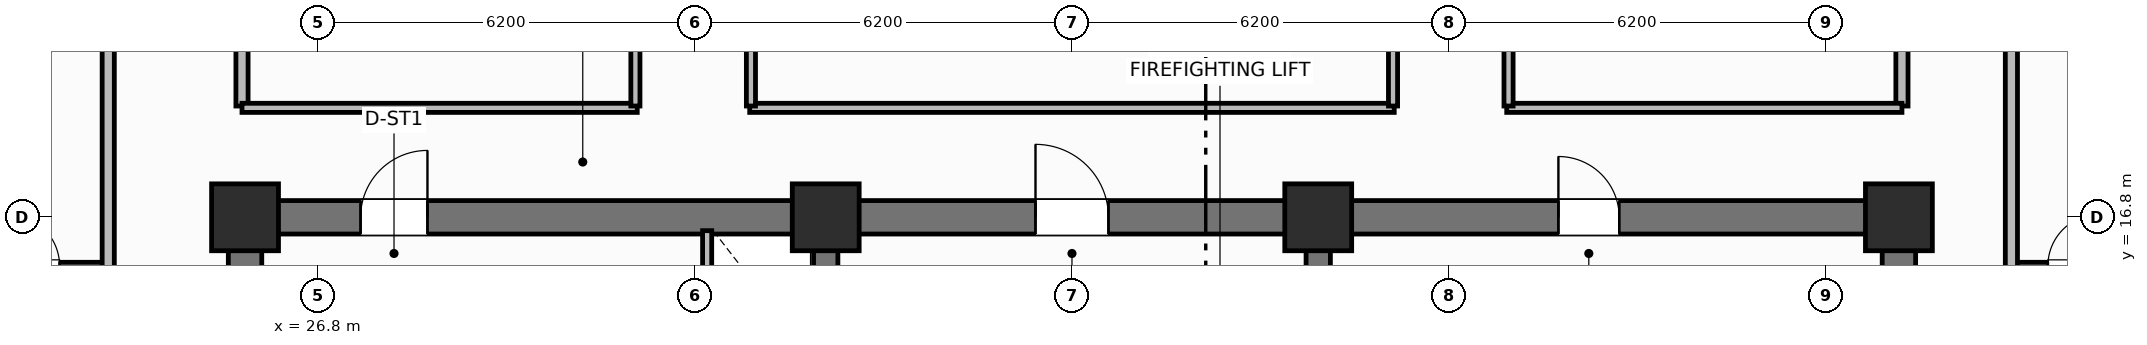
"""IFC4 building model, lengths in metres.
Left out: names, types, materials, properties, quantities, classifications, styles, units other than length and angle.
Written with IfcOpenShell. Run it as: python <this file> out.ifc"""

import sys

from ifc_helpers import new_model, si_unit, direction, frame, frame_2d, origin, origin_2d, place, context, subcontext, project, spatial, rectangle, extrude, element, fill, save


model = new_model("IFC4")
c1 = context("Model", 3, precision=1e-05, world=origin(), true_north=direction((0.0, 1.0)))
c2 = subcontext(c1, "Body", "Model", "MODEL_VIEW")
j1 = project(units=[si_unit("LENGTHUNIT", "METRE"), si_unit("PLANEANGLEUNIT", "RADIAN")], contexts=[c1])
p1 = place(None, origin())
s1 = spatial("IfcSite", under=j1, at=p1, CompositionType="ELEMENT")
p2 = place(p1, origin())
s2 = spatial("IfcBuilding", under=s1, at=p2, CompositionType="ELEMENT")
p3 = place(p2, frame((0.0, 0.0, 121.6)))
s3 = spatial("IfcBuildingStorey", under=s2, at=p3, CompositionType="ELEMENT", Elevation=121.6)
for number, where, z_axis, x_axis in (
    (1, (25.6, 10.875, 0.0), (0.0, 0.0, 1.0), (0.0, 1.0, 0.0)),
    (2, (52.8, 10.875, 0.0), (0.0, 0.0, 1.0), (0.0, 1.0, 0.0)),
):
    element("IfcWall", number, at=place(p3, frame(where, z_axis=z_axis, x_axis=x_axis)), inside=s3, PredefinedType="SHEAR", context=c2, shape_type="SweptSolid", body=[
        extrude(rectangle(XDim=5.65, YDim=0.55, at=frame_2d((2.825, 0.0))), origin(), (0.0, 0.0, 1.0), 3.7),
    ])
p4 = place(p3, frame((25.6, 16.8, 0.0), z_axis=(0.0, 0.0, 1.0), x_axis=(1.0, 0.0, 0.0)))
e3 = element("IfcWall", 3, at=p4, inside=s3, PredefinedType="SHEAR", context=c2, shape_type="SweptSolid", body=[
    extrude(rectangle(XDim=27.2, YDim=0.55, at=frame_2d((13.6, 0.0))), origin(), (0.0, 0.0, 1.0), 3.7),
])
p5 = place(p4, frame((1.9, 0.0, 0.0)))
e4 = element("IfcOpeningElement", 4, at=p5, cuts=e3, PredefinedType="OPENING", context=c2, shape_type="SweptSolid", body=[
    extrude(rectangle(XDim=1.1, YDim=2.15, at=frame_2d((0.55, 1.075))), frame((0.0, 0.285, 0.0), z_axis=(0.0, -1.0, 0.0), x_axis=(1.0, 0.0, 0.0)), (0.0, 0.0, 1.0), 0.57),
])
p6 = place(p4, frame((13.0, 0.0, 0.0)))
e5 = element("IfcOpeningElement", 5, at=p6, cuts=e3, PredefinedType="OPENING", context=c2, shape_type="SweptSolid", body=[
    extrude(rectangle(XDim=1.2, YDim=2.15, at=frame_2d((0.6, 1.075))), frame((0.0, 0.285, 0.0), z_axis=(0.0, -1.0, 0.0), x_axis=(1.0, 0.0, 0.0)), (0.0, 0.0, 1.0), 0.57),
])
p7 = place(p4, frame((21.6, 0.0, 0.0)))
e6 = element("IfcOpeningElement", 6, at=p7, cuts=e3, PredefinedType="OPENING", context=c2, shape_type="SweptSolid", body=[
    extrude(rectangle(XDim=1.0, YDim=2.15, at=frame_2d((0.5, 1.075))), frame((0.0, 0.285, 0.0), z_axis=(0.0, -1.0, 0.0), x_axis=(1.0, 0.0, 0.0)), (0.0, 0.0, 1.0), 0.57),
])
for number, where, z_axis, x_axis in (
    (7, (35.15, 10.875, 0.0), (0.0, 0.0, 1.0), (0.0, 1.0, 0.0)),
    (8, (43.25, 10.875, 0.0), (0.0, 0.0, 1.0), (0.0, 1.0, 0.0)),
):
    element("IfcWall", number, at=place(p3, frame(where, z_axis=z_axis, x_axis=x_axis)), inside=s3, PredefinedType="SHEAR", context=c2, shape_type="SweptSolid", body=[
        extrude(rectangle(XDim=5.65, YDim=0.4, at=frame_2d((2.825, 0.0))), origin(), (0.0, 0.0, 1.0), 3.7),
    ])
for number, where, z_axis, x_axis in (
    (9, (25.6, 16.8, 0.0), (0.0, 0.0, 1.0), (1.0, 0.0, 0.0)),
    (10, (35.15, 16.8, 0.0), (0.0, 0.0, 1.0), (1.0, 0.0, 0.0)),
    (11, (43.25, 16.8, 0.0), (0.0, 0.0, 1.0), (1.0, 0.0, 0.0)),
    (12, (52.8, 16.8, 0.0), (0.0, 0.0, 1.0), (1.0, 0.0, 0.0)),
):
    element("IfcColumn", number, at=place(p3, frame(where, z_axis=z_axis, x_axis=x_axis)), inside=s3, PredefinedType="COLUMN", context=c2, shape_type="SweptSolid", body=[
        extrude(rectangle(XDim=1.1, YDim=1.1, at=origin_2d()), origin(), (0.0, 0.0, 1.0), 3.7),
    ])
p8 = place(p3, frame((33.2, 14.5, 0.0), z_axis=(0.0, 0.0, 1.0), x_axis=(0.0, 1.0, 0.0)))
e13 = element("IfcWall", 13, at=p8, inside=s3, PredefinedType="PARTITIONING", context=c2, shape_type="SweptSolid", body=[
    extrude(rectangle(XDim=2.08, YDim=0.15, at=frame_2d((1.04, 0.0))), origin(), (0.0, 0.0, 1.0), 2.53),
])
p9 = place(p8, frame((0.55, 0.0, 0.0)))
e14 = element("IfcOpeningElement", 14, at=p9, cuts=e13, PredefinedType="OPENING", context=c2, shape_type="SweptSolid", body=[
    extrude(rectangle(XDim=0.85, YDim=2.05, at=frame_2d((0.425, 1.025))), frame((0.0, 0.085, 0.0), z_axis=(0.0, -1.0, 0.0), x_axis=(1.0, 0.0, 0.0)), (0.0, 0.0, 1.0), 0.17),
])
for number, where, z_axis, x_axis in (
    (15, (25.55, 18.63, 0.0), (0.0, 0.0, 1.0), (0.0, 1.0, 0.0)),
    (16, (52.85, 18.63, 0.0), (0.0, 0.0, 1.0), (0.0, 1.0, 0.0)),
):
    element("IfcWall", number, at=place(p3, frame(where, z_axis=z_axis, x_axis=x_axis)), inside=s3, PredefinedType="PARTITIONING", context=c2, shape_type="SweptSolid", body=[
        extrude(rectangle(XDim=19.14, YDim=0.2, at=frame_2d((9.57, 0.0))), origin(), (0.0, 0.0, 1.0), 2.53),
    ])
p10 = place(p3, frame((25.55, 18.6, 0.0), z_axis=(0.0, 0.0, 1.0), x_axis=(1.0, 0.0, 0.0)))
e17 = element("IfcWall", 17, at=p10, inside=s3, PredefinedType="PARTITIONING", context=c2, shape_type="SweptSolid", body=[
    extrude(rectangle(XDim=6.5, YDim=0.15, at=frame_2d((3.25, 0.0))), origin(), (0.0, 0.0, 1.0), 2.53),
])
p11 = place(p3, frame((33.9, 18.6, 0.0), z_axis=(0.0, 0.0, 1.0), x_axis=(1.0, 0.0, 0.0)))
e18 = element("IfcWall", 18, at=p11, inside=s3, PredefinedType="PARTITIONING", context=c2, shape_type="SweptSolid", body=[
    extrude(rectangle(XDim=10.6, YDim=0.15, at=frame_2d((5.3, 0.0))), origin(), (0.0, 0.0, 1.0), 2.53),
])
p12 = place(p3, frame((46.35, 18.6, 0.0), z_axis=(0.0, 0.0, 1.0), x_axis=(1.0, 0.0, 0.0)))
e19 = element("IfcWall", 19, at=p12, inside=s3, PredefinedType="PARTITIONING", context=c2, shape_type="SweptSolid", body=[
    extrude(rectangle(XDim=6.5, YDim=0.15, at=frame_2d((3.25, 0.0))), origin(), (0.0, 0.0, 1.0), 2.53),
])
p13 = place(p3, frame((32.02, 18.63, 0.0), z_axis=(0.0, 0.0, 1.0), x_axis=(0.0, 1.0, 0.0)))
e20 = element("IfcWall", 20, at=p13, inside=s3, PredefinedType="PARTITIONING", context=c2, shape_type="SweptSolid", body=[
    extrude(rectangle(XDim=19.14, YDim=0.15, at=frame_2d((9.57, 0.0))), origin(), (0.0, 0.0, 1.0), 2.53),
])
p14 = place(p13, frame((5.0, 0.0, 0.0)))
e21 = element("IfcOpeningElement", 21, at=p14, cuts=e20, PredefinedType="OPENING", context=c2, shape_type="SweptSolid", body=[
    extrude(rectangle(XDim=0.9, YDim=2.1, at=frame_2d((0.45, 1.05))), frame((0.0, 0.085, 0.0), z_axis=(0.0, -1.0, 0.0), x_axis=(1.0, 0.0, 0.0)), (0.0, 0.0, 1.0), 0.17),
])
p15 = place(p3, frame((33.92, 18.63, 0.0), z_axis=(0.0, 0.0, 1.0), x_axis=(0.0, 1.0, 0.0)))
e22 = element("IfcWall", 22, at=p15, inside=s3, PredefinedType="PARTITIONING", context=c2, shape_type="SweptSolid", body=[
    extrude(rectangle(XDim=19.14, YDim=0.15, at=frame_2d((9.57, 0.0))), origin(), (0.0, 0.0, 1.0), 2.53),
])
p16 = place(p15, frame((6.5, 0.0, 0.0)))
e23 = element("IfcOpeningElement", 23, at=p16, cuts=e22, PredefinedType="OPENING", context=c2, shape_type="SweptSolid", body=[
    extrude(rectangle(XDim=1.0, YDim=2.15, at=frame_2d((0.5, 1.075))), frame((0.0, 0.085, 0.0), z_axis=(0.0, -1.0, 0.0), x_axis=(1.0, 0.0, 0.0)), (0.0, 0.0, 1.0), 0.17),
])
p17 = place(p3, frame((44.48, 18.63, 0.0), z_axis=(0.0, 0.0, 1.0), x_axis=(0.0, 1.0, 0.0)))
e24 = element("IfcWall", 24, at=p17, inside=s3, PredefinedType="PARTITIONING", context=c2, shape_type="SweptSolid", body=[
    extrude(rectangle(XDim=19.14, YDim=0.15, at=frame_2d((9.57, 0.0))), origin(), (0.0, 0.0, 1.0), 2.53),
])
p18 = place(p3, frame((46.38, 18.63, 0.0), z_axis=(0.0, 0.0, 1.0), x_axis=(0.0, 1.0, 0.0)))
e25 = element("IfcWall", 25, at=p18, inside=s3, PredefinedType="PARTITIONING", context=c2, shape_type="SweptSolid", body=[
    extrude(rectangle(XDim=19.14, YDim=0.15, at=frame_2d((9.57, 0.0))), origin(), (0.0, 0.0, 1.0), 2.53),
])
p19 = place(p18, frame((3.0, 0.0, 0.0)))
e26 = element("IfcOpeningElement", 26, at=p19, cuts=e25, PredefinedType="OPENING", context=c2, shape_type="SweptSolid", body=[
    extrude(rectangle(XDim=0.9, YDim=2.1, at=frame_2d((0.45, 1.05))), frame((0.0, 0.085, 0.0), z_axis=(0.0, -1.0, 0.0), x_axis=(1.0, 0.0, 0.0)), (0.0, 0.0, 1.0), 0.17),
])
p20 = place(p18, frame((11.5, 0.0, 0.0)))
e27 = element("IfcOpeningElement", 27, at=p20, cuts=e25, PredefinedType="OPENING", context=c2, shape_type="SweptSolid", body=[
    extrude(rectangle(XDim=0.9, YDim=2.1, at=frame_2d((0.45, 1.05))), frame((0.0, 0.085, 0.0), z_axis=(0.0, -1.0, 0.0), x_axis=(1.0, 0.0, 0.0)), (0.0, 0.0, 1.0), 0.17),
])
p21 = place(p3, frame((21.1, 16.0, 0.0), z_axis=(0.0, 0.0, 1.0), x_axis=(1.0, 0.0, 0.0)))
e28 = element("IfcWall", 28, at=p21, inside=s3, PredefinedType="PARTITIONING", context=c2, shape_type="SweptSolid", body=[
    extrude(rectangle(XDim=2.25, YDim=0.12, at=frame_2d((1.125, 0.0))), origin(), (0.0, 0.0, 1.0), 2.53),
])
p22 = place(p21, frame((0.6, 0.0, 0.0)))
e29 = element("IfcOpeningElement", 29, at=p22, cuts=e28, PredefinedType="OPENING", context=c2, shape_type="SweptSolid", body=[
    extrude(rectangle(XDim=0.85, YDim=2.1, at=frame_2d((0.425, 1.05))), frame((0.0, 0.07, 0.0), z_axis=(0.0, -1.0, 0.0), x_axis=(1.0, 0.0, 0.0)), (0.0, 0.0, 1.0), 0.14),
])
p23 = place(p3, frame((23.35, 10.6, 0.0), z_axis=(0.0, 0.0, 1.0), x_axis=(0.0, 1.0, 0.0)))
e30 = element("IfcWall", 30, at=p23, inside=s3, PredefinedType="PARTITIONING", context=c2, shape_type="SweptSolid", body=[
    extrude(rectangle(XDim=35.2, YDim=0.2, at=frame_2d((17.6, 0.0))), origin(), (0.0, 0.0, 1.0), 2.53),
])
p24 = place(p23, frame((2.65, 0.0, 0.0)))
e31 = element("IfcOpeningElement", 31, at=p24, cuts=e30, PredefinedType="OPENING", context=c2, shape_type="SweptSolid", body=[
    extrude(rectangle(XDim=1.0, YDim=2.15, at=frame_2d((0.5, 1.075))), frame((0.0, 0.11, 0.0), z_axis=(0.0, -1.0, 0.0), x_axis=(1.0, 0.0, 0.0)), (0.0, 0.0, 1.0), 0.22),
])
p25 = place(p23, frame((19.95, 0.0, 0.0)))
e32 = element("IfcOpeningElement", 32, at=p25, cuts=e30, PredefinedType="OPENING", context=c2, shape_type="SweptSolid", body=[
    extrude(rectangle(XDim=1.0, YDim=2.15, at=frame_2d((0.5, 1.075))), frame((0.0, 0.11, 0.0), z_axis=(0.0, -1.0, 0.0), x_axis=(1.0, 0.0, 0.0)), (0.0, 0.0, 1.0), 0.22),
])
p26 = place(p3, frame((54.65, 16.0, 0.0), z_axis=(0.0, 0.0, 1.0), x_axis=(1.0, 0.0, 0.0)))
e33 = element("IfcWall", 33, at=p26, inside=s3, PredefinedType="PARTITIONING", context=c2, shape_type="SweptSolid", body=[
    extrude(rectangle(XDim=2.25, YDim=0.12, at=frame_2d((1.125, 0.0))), origin(), (0.0, 0.0, 1.0), 2.53),
])
p27 = place(p26, frame((0.6, 0.0, 0.0)))
e34 = element("IfcOpeningElement", 34, at=p27, cuts=e33, PredefinedType="OPENING", context=c2, shape_type="SweptSolid", body=[
    extrude(rectangle(XDim=0.85, YDim=2.1, at=frame_2d((0.425, 1.05))), frame((0.0, 0.07, 0.0), z_axis=(0.0, -1.0, 0.0), x_axis=(1.0, 0.0, 0.0)), (0.0, 0.0, 1.0), 0.14),
])
p28 = place(p3, frame((54.65, 10.6, 0.0), z_axis=(0.0, 0.0, 1.0), x_axis=(0.0, 1.0, 0.0)))
e35 = element("IfcWall", 35, at=p28, inside=s3, PredefinedType="PARTITIONING", context=c2, shape_type="SweptSolid", body=[
    extrude(rectangle(XDim=35.2, YDim=0.2, at=frame_2d((17.6, 0.0))), origin(), (0.0, 0.0, 1.0), 2.53),
])
p29 = place(p28, frame((2.65, 0.0, 0.0)))
e36 = element("IfcOpeningElement", 36, at=p29, cuts=e35, PredefinedType="OPENING", context=c2, shape_type="SweptSolid", body=[
    extrude(rectangle(XDim=1.0, YDim=2.15, at=frame_2d((0.5, 1.075))), frame((0.0, 0.11, 0.0), z_axis=(0.0, -1.0, 0.0), x_axis=(1.0, 0.0, 0.0)), (0.0, 0.0, 1.0), 0.22),
])
p30 = place(p28, frame((12.518, 0.0, 0.0)))
e37 = element("IfcOpeningElement", 37, at=p30, cuts=e35, PredefinedType="OPENING", context=c2, shape_type="SweptSolid", body=[
    extrude(rectangle(XDim=1.0, YDim=2.15, at=frame_2d((0.5, 1.075))), frame((0.0, 0.11, 0.0), z_axis=(0.0, -1.0, 0.0), x_axis=(1.0, 0.0, 0.0)), (0.0, 0.0, 1.0), 0.22),
])
p31 = place(p28, frame((23.65, 0.0, 0.0)))
e38 = element("IfcOpeningElement", 38, at=p31, cuts=e35, PredefinedType="OPENING", context=c2, shape_type="SweptSolid", body=[
    extrude(rectangle(XDim=1.0, YDim=2.15, at=frame_2d((0.5, 1.075))), frame((0.0, 0.11, 0.0), z_axis=(0.0, -1.0, 0.0), x_axis=(1.0, 0.0, 0.0)), (0.0, 0.0, 1.0), 0.22),
])
p32 = place(p22, origin())
e39 = element("IfcDoor", 39, at=p32, inside=s3, OperationType="SINGLE_SWING_LEFT", PredefinedType="DOOR", context=c2, shape_type="SweptSolid", body=[
    extrude(rectangle(XDim=0.85, YDim=2.1, at=frame_2d((0.425, 1.05))), frame((0.0, 0.025, 0.0), z_axis=(0.0, -1.0, 0.0), x_axis=(1.0, 0.0, 0.0)), (0.0, 0.0, 1.0), 0.05),
])
fill(e29, e39)
p33 = place(p27, origin())
e40 = element("IfcDoor", 40, at=p33, inside=s3, OperationType="SINGLE_SWING_RIGHT", PredefinedType="DOOR", context=c2, shape_type="SweptSolid", body=[
    extrude(rectangle(XDim=0.85, YDim=2.1, at=frame_2d((0.425, 1.05))), frame((0.0, 0.025, 0.0), z_axis=(0.0, -1.0, 0.0), x_axis=(1.0, 0.0, 0.0)), (0.0, 0.0, 1.0), 0.05),
])
fill(e34, e40)
p34 = place(p5, origin())
e41 = element("IfcDoor", 41, at=p34, inside=s3, OperationType="SINGLE_SWING_RIGHT", PredefinedType="DOOR", context=c2, shape_type="SweptSolid", body=[
    extrude(rectangle(XDim=1.1, YDim=2.15, at=frame_2d((0.55, 1.075))), frame((0.0, 0.025, 0.0), z_axis=(0.0, -1.0, 0.0), x_axis=(1.0, 0.0, 0.0)), (0.0, 0.0, 1.0), 0.05),
])
fill(e4, e41)
p35 = place(p6, origin())
e42 = element("IfcDoor", 42, at=p35, inside=s3, OperationType="SINGLE_SWING_LEFT", PredefinedType="DOOR", context=c2, shape_type="SweptSolid", body=[
    extrude(rectangle(XDim=1.2, YDim=2.15, at=frame_2d((0.6, 1.075))), frame((0.0, 0.025, 0.0), z_axis=(0.0, -1.0, 0.0), x_axis=(1.0, 0.0, 0.0)), (0.0, 0.0, 1.0), 0.05),
])
fill(e5, e42)
p36 = place(p7, origin())
e43 = element("IfcDoor", 43, at=p36, inside=s3, OperationType="SINGLE_SWING_LEFT", PredefinedType="DOOR", context=c2, shape_type="SweptSolid", body=[
    extrude(rectangle(XDim=1.0, YDim=2.15, at=frame_2d((0.5, 1.075))), frame((0.0, 0.025, 0.0), z_axis=(0.0, -1.0, 0.0), x_axis=(1.0, 0.0, 0.0)), (0.0, 0.0, 1.0), 0.05),
])
fill(e6, e43)
save(model, sys.argv[1])
